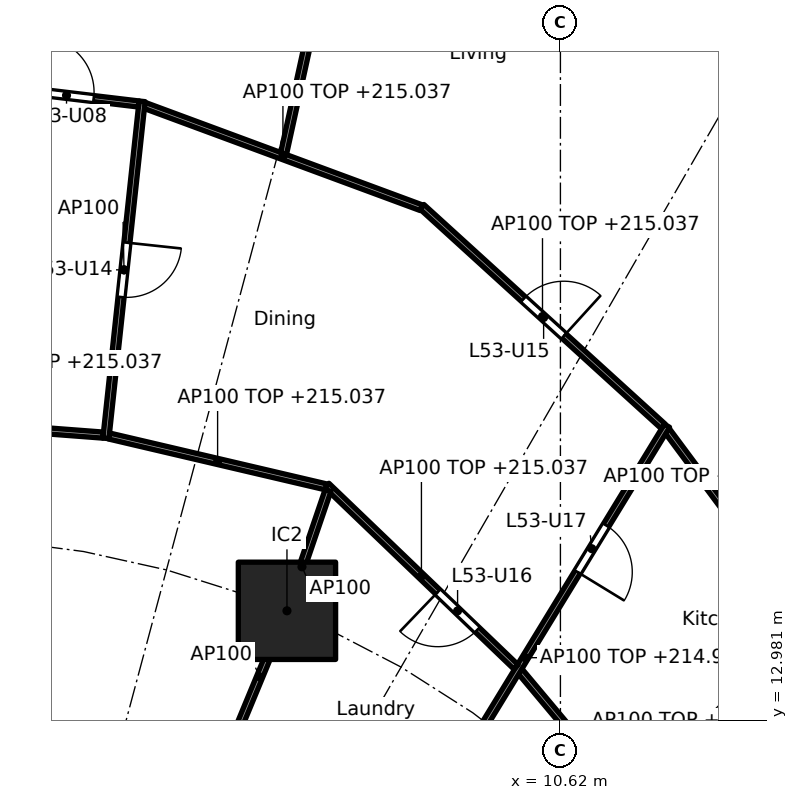
"""IFC4 building model, lengths in metres.
Left out: names, types, materials, properties, quantities, classifications, styles, units other than length and angle.
Written with IfcOpenShell. Run it as: python <this file> out.ifc"""

import sys

from ifc_helpers import new_model, si_unit, direction, frame, frame_2d, origin, origin_2d, place, context, subcontext, project, spatial, rectangle, extrude, element, fill, save


model = new_model("IFC4")
c1 = context("Model", 3, precision=1e-05, world=origin(), true_north=direction((0.0, 1.0)))
c2 = subcontext(c1, "Body", "Model", "MODEL_VIEW")
j1 = project(units=[si_unit("LENGTHUNIT", "METRE"), si_unit("PLANEANGLEUNIT", "RADIAN")], contexts=[c1])
p1 = place(None, origin())
s1 = spatial("IfcSite", under=j1, at=p1, CompositionType="ELEMENT")
p2 = place(p1, origin())
s2 = spatial("IfcBuilding", under=s1, at=p2, CompositionType="ELEMENT")
p3 = place(p2, frame((0.0, 0.0, 212.2)))
s3 = spatial("IfcBuildingStorey", under=s2, at=p3, CompositionType="ELEMENT", Elevation=212.2)
p4 = place(p3, frame((6.123, 14.782, 0.0), z_axis=(0.0, 0.0, 1.0), x_axis=(1.0, 0.0, 0.0)))
e1 = element("IfcColumn", 1, at=p4, inside=s3, PredefinedType="COLUMN", context=c2, shape_type="SweptSolid", body=[
    extrude(rectangle(XDim=1.6, YDim=1.6, at=origin_2d()), origin(), (0.0, 0.0, 1.0), 3.7),
])
p5 = place(p3, frame((12.759, 10.443, 0.0), z_axis=(0.0, 0.0, 1.0), x_axis=(-0.642225196965, 0.766516011825, 0.0)))
e2 = element("IfcWall", 2, at=p5, inside=s3, PredefinedType="PARTITIONING", context=c2, shape_type="SweptSolid", body=[
    extrude(rectangle(XDim=4.361, YDim=0.1, at=frame_2d((2.18, 0.0))), origin(), (0.0, 0.0, 1.0), 2.837),
])
p6 = place(p3, frame((15.621, 13.374, 0.0), z_axis=(0.0, 0.0, 1.0), x_axis=(-0.596174489482, 0.8028548923, 0.0)))
e3 = element("IfcWall", 3, at=p6, inside=s3, PredefinedType="PARTITIONING", context=c2, shape_type="SweptSolid", body=[
    extrude(rectangle(XDim=5.442, YDim=0.1, at=frame_2d((2.721, 0.0))), origin(), (0.0, 0.0, 1.0), 2.837),
])
p7 = place(p3, frame((7.71, 10.197, 0.0), z_axis=(0.0, 0.0, 1.0), x_axis=(0.521477621335, 0.853264959111, 0.0)))
e4 = element("IfcWall", 4, at=p7, inside=s3, PredefinedType="PARTITIONING", context=c2, shape_type="SweptSolid", body=[
    extrude(rectangle(XDim=8.941, YDim=0.1, at=frame_2d((4.471, 0.0))), origin(), (0.0, 0.0, 1.0), 2.762),
])
p8 = place(p7, frame((6.121, 0.0, 0.0)))
e5 = element("IfcOpeningElement", 5, at=p8, cuts=e4, PredefinedType="OPENING", context=c2, shape_type="SweptSolid", body=[
    extrude(rectangle(XDim=0.9, YDim=2.1, at=frame_2d((0.45, 1.05))), frame((0.0, 0.06, 0.0), z_axis=(0.0, -1.0, 0.0), x_axis=(1.0, 0.0, 0.0)), (0.0, 0.0, 1.0), 0.12),
])
p9 = place(p3, frame((9.89, 13.858, 0.0), z_axis=(0.0, 0.0, 1.0), x_axis=(-0.72167233993, 0.692234811159, 0.0)))
e6 = element("IfcWall", 6, at=p9, inside=s3, PredefinedType="PARTITIONING", context=c2, shape_type="SweptSolid", body=[
    extrude(rectangle(XDim=4.313, YDim=0.1, at=frame_2d((2.156, 0.0))), origin(), (0.0, 0.0, 1.0), 2.837),
])
p10 = place(p9, frame((0.883, 0.0, 0.0)))
e7 = element("IfcOpeningElement", 7, at=p10, cuts=e6, PredefinedType="OPENING", context=c2, shape_type="SweptSolid", body=[
    extrude(rectangle(XDim=0.9, YDim=2.1, at=frame_2d((0.45, 1.05))), frame((0.0, 0.06, 0.0), z_axis=(0.0, -1.0, 0.0), x_axis=(1.0, 0.0, 0.0)), (0.0, 0.0, 1.0), 0.12),
])
p11 = place(p3, frame((12.31, 17.817, 0.0), z_axis=(0.0, 0.0, 1.0), x_axis=(-0.739697052892, 0.672940019573, 0.0)))
e8 = element("IfcWall", 8, at=p11, inside=s3, PredefinedType="PARTITIONING", context=c2, shape_type="SweptSolid", body=[
    extrude(rectangle(XDim=5.365, YDim=0.1, at=frame_2d((2.683, 0.0))), origin(), (0.0, 0.0, 1.0), 2.837),
])
p12 = place(p11, frame((2.208, 0.0, 0.0)))
e9 = element("IfcOpeningElement", 9, at=p12, cuts=e8, PredefinedType="OPENING", context=c2, shape_type="SweptSolid", body=[
    extrude(rectangle(XDim=0.9, YDim=2.1, at=frame_2d((0.45, 1.05))), frame((0.0, 0.06, 0.0), z_axis=(0.0, -1.0, 0.0), x_axis=(1.0, 0.0, 0.0)), (0.0, 0.0, 1.0), 0.12),
])
p13 = place(p3, frame((5.243, 12.657, 0.0), z_axis=(0.0, 0.0, 1.0), x_axis=(0.382719158442, 0.923864733477, 0.0)))
e10 = element("IfcWall", 10, at=p13, inside=s3, PredefinedType="PARTITIONING", context=c2, shape_type="SweptSolid", body=[
    extrude(rectangle(XDim=2.25, YDim=0.1, at=frame_2d((1.125, 0.0))), origin(), (0.0, 0.0, 1.0), 3.44),
])
p14 = place(p3, frame((6.139, 14.829, 0.0), z_axis=(0.0, 0.0, 1.0), x_axis=(0.32278593828, 0.946471995385, 0.0)))
e11 = element("IfcWall", 11, at=p14, inside=s3, PredefinedType="PARTITIONING", context=c2, shape_type="SweptSolid", body=[
    extrude(rectangle(XDim=2.042, YDim=0.1, at=frame_2d((1.021, 0.0))), origin(), (0.0, 0.0, 1.0), 3.44),
])
p15 = place(p3, frame((6.766, 16.82, 0.0), z_axis=(0.0, 0.0, 1.0), x_axis=(-0.973612608559, 0.22820711745, 0.0)))
e12 = element("IfcWall", 12, at=p15, inside=s3, PredefinedType="PARTITIONING", context=c2, shape_type="SweptSolid", body=[
    extrude(rectangle(XDim=3.663, YDim=0.1, at=frame_2d((1.832, 0.0))), origin(), (0.0, 0.0, 1.0), 2.837),
])
p16 = place(p3, frame((8.331, 21.411, 0.0), z_axis=(0.0, 0.0, 1.0), x_axis=(-0.937891982431, 0.346927412136, 0.0)))
e13 = element("IfcWall", 13, at=p16, inside=s3, PredefinedType="PARTITIONING", context=c2, shape_type="SweptSolid", body=[
    extrude(rectangle(XDim=4.85, YDim=0.1, at=frame_2d((2.425, 0.0))), origin(), (0.0, 0.0, 1.0), 2.837),
])
p17 = place(p3, frame((6.067, 22.301, 0.0), z_axis=(0.0, 0.0, 1.0), x_axis=(0.214401821533, 0.976745544614, 0.0)))
e14 = element("IfcWall", 14, at=p17, inside=s3, PredefinedType="PARTITIONING", context=c2, shape_type="SweptSolid", body=[
    extrude(rectangle(XDim=6.228, YDim=0.1, at=frame_2d((3.114, 0.0))), origin(), (0.0, 0.0, 1.0), 2.983),
])
p18 = place(p3, frame((3.145, 17.618, 0.0), z_axis=(0.0, 0.0, 1.0), x_axis=(0.106820754108, 0.994278294288, 0.0)))
e15 = element("IfcWall", 15, at=p18, inside=s3, PredefinedType="PARTITIONING", context=c2, shape_type="SweptSolid", body=[
    extrude(rectangle(XDim=5.574, YDim=0.1, at=frame_2d((2.787, 0.0))), origin(), (0.0, 0.0, 1.0), 3.44),
])
p19 = place(p18, frame((2.337, 0.0, 0.0)))
e16 = element("IfcOpeningElement", 16, at=p19, cuts=e15, PredefinedType="OPENING", context=c2, shape_type="SweptSolid", body=[
    extrude(rectangle(XDim=0.9, YDim=2.1, at=frame_2d((0.45, 1.05))), frame((0.0, 0.06, 0.0), z_axis=(0.0, -1.0, 0.0), x_axis=(1.0, 0.0, 0.0)), (0.0, 0.0, 1.0), 0.12),
])
p20 = place(p3, frame((3.101, 17.671, 0.0), z_axis=(0.0, 0.0, 1.0), x_axis=(-0.997133705575, 0.075659587668, 0.0)))
e17 = element("IfcWall", 17, at=p20, inside=s3, PredefinedType="PARTITIONING", context=c2, shape_type="SweptSolid", body=[
    extrude(rectangle(XDim=3.601, YDim=0.1, at=frame_2d((1.801, 0.0))), origin(), (0.0, 0.0, 1.0), 2.837),
])
p21 = place(p3, frame((3.686, 23.117, 0.0), z_axis=(0.0, 0.0, 1.0), x_axis=(-0.992965872314, 0.11840091393, 0.0)))
e18 = element("IfcWall", 18, at=p21, inside=s3, PredefinedType="PARTITIONING", context=c2, shape_type="SweptSolid", body=[
    extrude(rectangle(XDim=4.786, YDim=0.1, at=frame_2d((2.393, 0.0))), origin(), (0.0, 0.0, 1.0), 2.837),
])
p22 = place(p21, frame((0.746, 0.0, 0.0)))
e19 = element("IfcOpeningElement", 19, at=p22, cuts=e18, PredefinedType="OPENING", context=c2, shape_type="SweptSolid", body=[
    extrude(rectangle(XDim=0.9, YDim=2.1, at=frame_2d((0.45, 1.05))), frame((0.0, 0.06, 0.0), z_axis=(0.0, -1.0, 0.0), x_axis=(1.0, 0.0, 0.0)), (0.0, 0.0, 1.0), 0.12),
])
p23 = place(p22, frame((0.9, 0.0, 0.0), x_axis=(-1.0, 0.0, 0.0)))
e20 = element("IfcDoor", 20, at=p23, inside=s3, OperationType="SINGLE_SWING_LEFT", PredefinedType="DOOR", context=c2, shape_type="SweptSolid", body=[
    extrude(rectangle(XDim=0.9, YDim=2.1, at=frame_2d((0.45, 1.05))), frame((0.0, 0.025, 0.0), z_axis=(0.0, -1.0, 0.0), x_axis=(1.0, 0.0, 0.0)), (0.0, 0.0, 1.0), 0.05),
])
fill(e19, e20)
p24 = place(p19, frame((0.9, 0.0, 0.0), x_axis=(-1.0, 0.0, 0.0)))
e21 = element("IfcDoor", 21, at=p24, inside=s3, OperationType="SINGLE_SWING_LEFT", PredefinedType="DOOR", context=c2, shape_type="SweptSolid", body=[
    extrude(rectangle(XDim=0.9, YDim=2.1, at=frame_2d((0.45, 1.05))), frame((0.0, 0.025, 0.0), z_axis=(0.0, -1.0, 0.0), x_axis=(1.0, 0.0, 0.0)), (0.0, 0.0, 1.0), 0.05),
])
fill(e16, e21)
p25 = place(p12, frame((0.9, 0.0, 0.0), x_axis=(-1.0, 0.0, 0.0)))
e22 = element("IfcDoor", 22, at=p25, inside=s3, OperationType="SINGLE_SWING_RIGHT", PredefinedType="DOOR", context=c2, shape_type="SweptSolid", body=[
    extrude(rectangle(XDim=0.9, YDim=2.1, at=frame_2d((0.45, 1.05))), frame((0.0, 0.025, 0.0), z_axis=(0.0, -1.0, 0.0), x_axis=(1.0, 0.0, 0.0)), (0.0, 0.0, 1.0), 0.05),
])
fill(e9, e22)
p26 = place(p10, origin())
e23 = element("IfcDoor", 23, at=p26, inside=s3, OperationType="SINGLE_SWING_RIGHT", PredefinedType="DOOR", context=c2, shape_type="SweptSolid", body=[
    extrude(rectangle(XDim=0.9, YDim=2.1, at=frame_2d((0.45, 1.05))), frame((0.0, 0.025, 0.0), z_axis=(0.0, -1.0, 0.0), x_axis=(1.0, 0.0, 0.0)), (0.0, 0.0, 1.0), 0.05),
])
fill(e7, e23)
p27 = place(p8, frame((0.9, 0.0, 0.0), x_axis=(-1.0, 0.0, 0.0)))
e24 = element("IfcDoor", 24, at=p27, inside=s3, OperationType="SINGLE_SWING_RIGHT", PredefinedType="DOOR", context=c2, shape_type="SweptSolid", body=[
    extrude(rectangle(XDim=0.9, YDim=2.1, at=frame_2d((0.45, 1.05))), frame((0.0, 0.025, 0.0), z_axis=(0.0, -1.0, 0.0), x_axis=(1.0, 0.0, 0.0)), (0.0, 0.0, 1.0), 0.05),
])
fill(e5, e24)
save(model, sys.argv[1])
